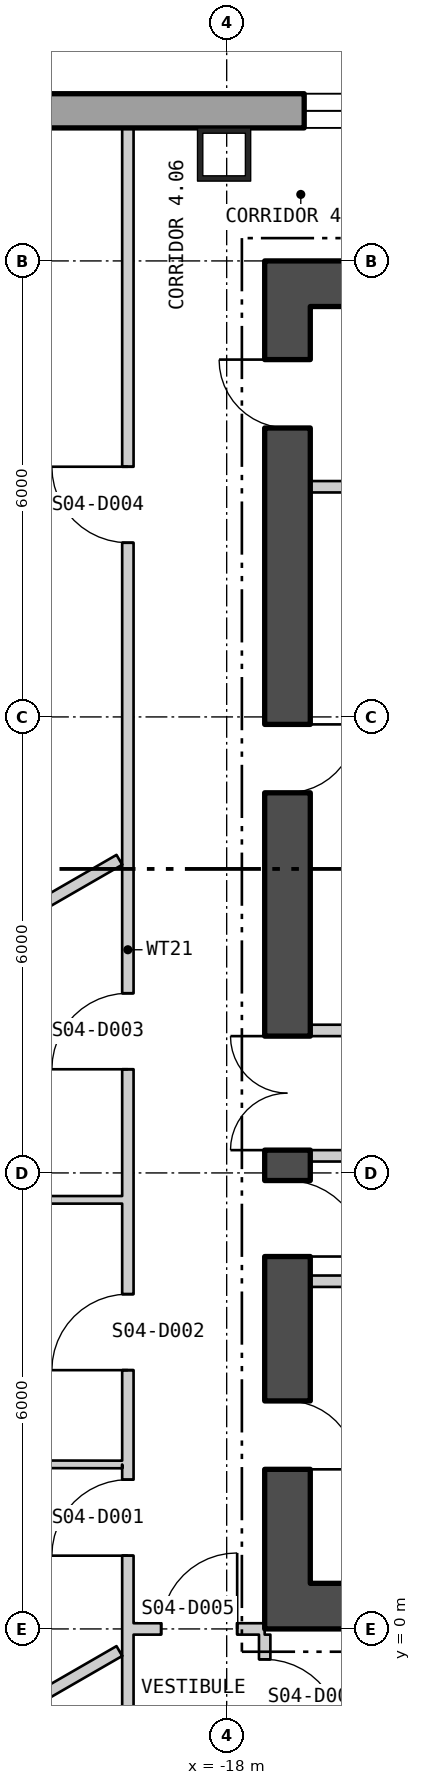
"""IFC4 building model, lengths in metres.
Left out: names, types, materials, properties, quantities, classifications, styles, units other than length and angle.
Written with IfcOpenShell. Run it as: python <this file> out.ifc"""

import sys

from ifc_helpers import new_model, si_unit, direction, frame, frame_2d, origin, origin_2d, place, context, subcontext, project, spatial, polyline, rectangle, hollow_rectangle, outline, extrude, element, fill, save


model = new_model("IFC4")
c1 = context("Model", 3, precision=1e-05, world=origin(), true_north=direction((0.0, 1.0)))
c2 = subcontext(c1, "Body", "Model", "MODEL_VIEW")
j1 = project(units=[si_unit("LENGTHUNIT", "METRE"), si_unit("PLANEANGLEUNIT", "RADIAN")], contexts=[c1])
p1 = place(None, origin())
s1 = spatial("IfcSite", under=j1, at=p1, CompositionType="ELEMENT")
p2 = place(p1, origin())
s2 = spatial("IfcBuilding", under=s1, at=p2, CompositionType="ELEMENT")
p3 = place(p2, frame((0.0, 0.0, 60.3)))
s3 = spatial("IfcBuildingStorey", under=s2, at=p3, CompositionType="ELEMENT", Elevation=60.3)
p4 = place(p3, frame((-18.034, 19.4, 0.0), z_axis=(0.0, 0.0, 1.0), x_axis=(-1.0, 0.0, 0.0)))
e1 = element("IfcColumn", 1, at=p4, inside=s3, PredefinedType="COLUMN", context=c2, shape_type="SweptSolid", body=[
    extrude(hollow_rectangle(XDim=0.7, YDim=0.7, WallThickness=0.07, at=origin_2d()), origin(), (0.0, 0.0, 1.0), 4.5),
])
p5 = place(p3, frame((22.875, 19.975, -0.4), z_axis=(0.0, 0.0, 1.0), x_axis=(-1.0, 0.0, 0.0)))
e2 = element("IfcWall", 2, at=p5, inside=s3, PredefinedType="SOLIDWALL", context=c2, shape_type="SweptSolid", body=[
    extrude(outline(polyline([(-0.13, -0.225), (45.88, -0.225), (45.62, 0.225), (0.13, 0.225), (-0.13, -0.225)])), origin(), (0.0, 0.0, 1.0), 4.5),
])
p6 = place(p5, frame((5.895, 0.0, 1.3)))
e3 = element("IfcOpeningElement", 3, at=p6, cuts=e2, PredefinedType="OPENING", context=c2, shape_type="SweptSolid", body=[
    extrude(rectangle(XDim=2.4, YDim=2.6, at=frame_2d((1.2, 1.3))), frame((0.0, 0.235, 0.0), z_axis=(0.0, -1.0, 0.0), x_axis=(1.0, 0.0, 0.0)), (0.0, 0.0, 1.0), 0.47),
])
p7 = place(p5, frame((10.403, 0.0, 1.3)))
e4 = element("IfcOpeningElement", 4, at=p7, cuts=e2, PredefinedType="OPENING", context=c2, shape_type="SweptSolid", body=[
    extrude(rectangle(XDim=2.4, YDim=2.6, at=frame_2d((1.2, 1.3))), frame((0.0, 0.235, 0.0), z_axis=(0.0, -1.0, 0.0), x_axis=(1.0, 0.0, 0.0)), (0.0, 0.0, 1.0), 0.47),
])
p8 = place(p5, frame((14.912, 0.0, 1.3)))
e5 = element("IfcOpeningElement", 5, at=p8, cuts=e2, PredefinedType="OPENING", context=c2, shape_type="SweptSolid", body=[
    extrude(rectangle(XDim=2.4, YDim=2.6, at=frame_2d((1.2, 1.3))), frame((0.0, 0.235, 0.0), z_axis=(0.0, -1.0, 0.0), x_axis=(1.0, 0.0, 0.0)), (0.0, 0.0, 1.0), 0.47),
])
p9 = place(p5, frame((19.421, 0.0, 1.3)))
e6 = element("IfcOpeningElement", 6, at=p9, cuts=e2, PredefinedType="OPENING", context=c2, shape_type="SweptSolid", body=[
    extrude(rectangle(XDim=2.4, YDim=2.6, at=frame_2d((1.2, 1.3))), frame((0.0, 0.235, 0.0), z_axis=(0.0, -1.0, 0.0), x_axis=(1.0, 0.0, 0.0)), (0.0, 0.0, 1.0), 0.47),
])
p10 = place(p5, frame((23.929, 0.0, 1.3)))
e7 = element("IfcOpeningElement", 7, at=p10, cuts=e2, PredefinedType="OPENING", context=c2, shape_type="SweptSolid", body=[
    extrude(rectangle(XDim=2.4, YDim=2.6, at=frame_2d((1.2, 1.3))), frame((0.0, 0.235, 0.0), z_axis=(0.0, -1.0, 0.0), x_axis=(1.0, 0.0, 0.0)), (0.0, 0.0, 1.0), 0.47),
])
p11 = place(p5, frame((28.438, 0.0, 1.3)))
e8 = element("IfcOpeningElement", 8, at=p11, cuts=e2, PredefinedType="OPENING", context=c2, shape_type="SweptSolid", body=[
    extrude(rectangle(XDim=2.4, YDim=2.6, at=frame_2d((1.2, 1.3))), frame((0.0, 0.235, 0.0), z_axis=(0.0, -1.0, 0.0), x_axis=(1.0, 0.0, 0.0)), (0.0, 0.0, 1.0), 0.47),
])
p12 = place(p5, frame((32.947, 0.0, 1.3)))
e9 = element("IfcOpeningElement", 9, at=p12, cuts=e2, PredefinedType="OPENING", context=c2, shape_type="SweptSolid", body=[
    extrude(rectangle(XDim=2.4, YDim=2.6, at=frame_2d((1.2, 1.3))), frame((0.0, 0.235, 0.0), z_axis=(0.0, -1.0, 0.0), x_axis=(1.0, 0.0, 0.0)), (0.0, 0.0, 1.0), 0.47),
])
p13 = place(p5, frame((37.455, 0.0, 1.3)))
e10 = element("IfcOpeningElement", 10, at=p13, cuts=e2, PredefinedType="OPENING", context=c2, shape_type="SweptSolid", body=[
    extrude(rectangle(XDim=2.4, YDim=2.6, at=frame_2d((1.2, 1.3))), frame((0.0, 0.235, 0.0), z_axis=(0.0, -1.0, 0.0), x_axis=(1.0, 0.0, 0.0)), (0.0, 0.0, 1.0), 0.47),
])
p14 = place(p3, frame((-28.3, 10.579, -0.18), z_axis=(0.0, 0.0, 1.0), x_axis=(0.499999388847, -0.866025756634, 0.0)))
e11 = element("IfcWall", 11, at=p14, inside=s3, PredefinedType="SOLIDWALL", context=c2, shape_type="SweptSolid", body=[
    extrude(outline(polyline([(-0.13, -0.225), (45.88, -0.225), (45.62, 0.225), (0.13, 0.225), (-0.13, -0.225)])), origin(), (0.0, 0.0, 1.0), 4.28),
])
p15 = place(p14, frame((1.425, 0.0, 1.08)))
e12 = element("IfcOpeningElement", 12, at=p15, cuts=e11, PredefinedType="OPENING", context=c2, shape_type="SweptSolid", body=[
    extrude(rectangle(XDim=2.4, YDim=2.6, at=frame_2d((1.2, 1.3))), frame((0.0, 0.235, 0.0), z_axis=(0.0, -1.0, 0.0), x_axis=(1.0, 0.0, 0.0)), (0.0, 0.0, 1.0), 0.47),
])
p16 = place(p14, frame((5.895, 0.0, 1.08)))
e13 = element("IfcOpeningElement", 13, at=p16, cuts=e11, PredefinedType="OPENING", context=c2, shape_type="SweptSolid", body=[
    extrude(rectangle(XDim=2.4, YDim=2.6, at=frame_2d((1.2, 1.3))), frame((0.0, 0.235, 0.0), z_axis=(0.0, -1.0, 0.0), x_axis=(1.0, 0.0, 0.0)), (0.0, 0.0, 1.0), 0.47),
])
p17 = place(p14, frame((10.403, 0.0, 1.08)))
e14 = element("IfcOpeningElement", 14, at=p17, cuts=e11, PredefinedType="OPENING", context=c2, shape_type="SweptSolid", body=[
    extrude(rectangle(XDim=2.4, YDim=2.6, at=frame_2d((1.2, 1.3))), frame((0.0, 0.235, 0.0), z_axis=(0.0, -1.0, 0.0), x_axis=(1.0, 0.0, 0.0)), (0.0, 0.0, 1.0), 0.47),
])
p18 = place(p14, frame((14.912, 0.0, 1.08)))
e15 = element("IfcOpeningElement", 15, at=p18, cuts=e11, PredefinedType="OPENING", context=c2, shape_type="SweptSolid", body=[
    extrude(rectangle(XDim=2.4, YDim=2.6, at=frame_2d((1.2, 1.3))), frame((0.0, 0.235, 0.0), z_axis=(0.0, -1.0, 0.0), x_axis=(1.0, 0.0, 0.0)), (0.0, 0.0, 1.0), 0.47),
])
p19 = place(p14, frame((19.421, 0.0, 1.08)))
e16 = element("IfcOpeningElement", 16, at=p19, cuts=e11, PredefinedType="OPENING", context=c2, shape_type="SweptSolid", body=[
    extrude(rectangle(XDim=2.4, YDim=2.6, at=frame_2d((1.2, 1.3))), frame((0.0, 0.235, 0.0), z_axis=(0.0, -1.0, 0.0), x_axis=(1.0, 0.0, 0.0)), (0.0, 0.0, 1.0), 0.47),
])
p20 = place(p14, frame((23.929, 0.0, 1.08)))
e17 = element("IfcOpeningElement", 17, at=p20, cuts=e11, PredefinedType="OPENING", context=c2, shape_type="SweptSolid", body=[
    extrude(rectangle(XDim=2.4, YDim=2.6, at=frame_2d((1.2, 1.3))), frame((0.0, 0.235, 0.0), z_axis=(0.0, -1.0, 0.0), x_axis=(1.0, 0.0, 0.0)), (0.0, 0.0, 1.0), 0.47),
])
p21 = place(p14, frame((28.438, 0.0, 1.08)))
e18 = element("IfcOpeningElement", 18, at=p21, cuts=e11, PredefinedType="OPENING", context=c2, shape_type="SweptSolid", body=[
    extrude(rectangle(XDim=2.4, YDim=2.6, at=frame_2d((1.2, 1.3))), frame((0.0, 0.235, 0.0), z_axis=(0.0, -1.0, 0.0), x_axis=(1.0, 0.0, 0.0)), (0.0, 0.0, 1.0), 0.47),
])
p22 = place(p14, frame((32.947, 0.0, 1.08)))
e19 = element("IfcOpeningElement", 19, at=p22, cuts=e11, PredefinedType="OPENING", context=c2, shape_type="SweptSolid", body=[
    extrude(rectangle(XDim=2.4, YDim=2.6, at=frame_2d((1.2, 1.3))), frame((0.0, 0.235, 0.0), z_axis=(0.0, -1.0, 0.0), x_axis=(1.0, 0.0, 0.0)), (0.0, 0.0, 1.0), 0.47),
])
p23 = place(p14, frame((37.455, 0.0, 1.08)))
e20 = element("IfcOpeningElement", 20, at=p23, cuts=e11, PredefinedType="OPENING", context=c2, shape_type="SweptSolid", body=[
    extrude(rectangle(XDim=2.4, YDim=2.6, at=frame_2d((1.2, 1.3))), frame((0.0, 0.235, 0.0), z_axis=(0.0, -1.0, 0.0), x_axis=(1.0, 0.0, 0.0)), (0.0, 0.0, 1.0), 0.47),
])
p24 = place(p14, frame((41.925, 0.0, 1.08)))
e21 = element("IfcOpeningElement", 21, at=p24, cuts=e11, PredefinedType="OPENING", context=c2, shape_type="SweptSolid", body=[
    extrude(rectangle(XDim=2.4, YDim=2.6, at=frame_2d((1.2, 1.3))), frame((0.0, 0.235, 0.0), z_axis=(0.0, -1.0, 0.0), x_axis=(1.0, 0.0, 0.0)), (0.0, 0.0, 1.0), 0.47),
])
p25 = place(p3, frame((-17.5, 0.3, 0.0), z_axis=(0.0, 0.0, 1.0), x_axis=(1.0, 0.0, 0.0)))
e22 = element("IfcWall", 22, at=p25, inside=s3, PredefinedType="SHEAR", context=c2, shape_type="SweptSolid", body=[
    extrude(rectangle(XDim=35.0, YDim=0.6, at=frame_2d((17.5, 0.0))), origin(), (0.0, 0.0, 1.0), 4.3),
])
p26 = place(p25, frame((12.0, 0.0, 0.0)))
e23 = element("IfcOpeningElement", 23, at=p26, cuts=e22, PredefinedType="OPENING", context=c2, shape_type="SweptSolid", body=[
    extrude(rectangle(XDim=1.8, YDim=2.4, at=frame_2d((0.9, 1.2))), frame((0.0, 0.31, 0.0), z_axis=(0.0, -1.0, 0.0), x_axis=(1.0, 0.0, 0.0)), (0.0, 0.0, 1.0), 0.62),
])
p27 = place(p25, frame((22.0, 0.0, 0.0)))
e24 = element("IfcOpeningElement", 24, at=p27, cuts=e22, PredefinedType="OPENING", context=c2, shape_type="SweptSolid", body=[
    extrude(rectangle(XDim=1.8, YDim=2.4, at=frame_2d((0.9, 1.2))), frame((0.0, 0.31, 0.0), z_axis=(0.0, -1.0, 0.0), x_axis=(1.0, 0.0, 0.0)), (0.0, 0.0, 1.0), 0.62),
])
p28 = place(p3, frame((-17.5, 17.7, 0.0), z_axis=(0.0, 0.0, 1.0), x_axis=(1.0, 0.0, 0.0)))
e25 = element("IfcWall", 25, at=p28, inside=s3, PredefinedType="SHEAR", context=c2, shape_type="SweptSolid", body=[
    extrude(rectangle(XDim=35.0, YDim=0.6, at=frame_2d((17.5, 0.0))), origin(), (0.0, 0.0, 1.0), 4.3),
])
p29 = place(p3, frame((-17.2, 0.6, 0.0), z_axis=(0.0, 0.0, 1.0), x_axis=(0.0, 1.0, 0.0)))
e26 = element("IfcWall", 26, at=p29, inside=s3, PredefinedType="SHEAR", context=c2, shape_type="SweptSolid", body=[
    extrude(rectangle(XDim=16.8, YDim=0.6, at=frame_2d((8.4, 0.0))), origin(), (0.0, 0.0, 1.0), 4.3),
])
p30 = place(p29, frame((5.7, 0.0, 0.0)))
e27 = element("IfcOpeningElement", 27, at=p30, cuts=e26, PredefinedType="OPENING", context=c2, shape_type="SweptSolid", body=[
    extrude(rectangle(XDim=1.5, YDim=2.1, at=frame_2d((0.75, 1.05))), frame((0.0, 0.31, 0.0), z_axis=(0.0, -1.0, 0.0), x_axis=(1.0, 0.0, 0.0)), (0.0, 0.0, 1.0), 0.62),
])
p31 = place(p29, frame((1.5, 0.0, 0.0)))
e28 = element("IfcOpeningElement", 28, at=p31, cuts=e26, PredefinedType="OPENING", context=c2, shape_type="SweptSolid", body=[
    extrude(rectangle(XDim=0.9, YDim=2.1, at=frame_2d((0.45, 1.05))), frame((0.0, 0.31, 0.0), z_axis=(0.0, -1.0, 0.0), x_axis=(1.0, 0.0, 0.0)), (0.0, 0.0, 1.0), 0.62),
])
p32 = place(p29, frame((4.3, 0.0, 0.0)))
e29 = element("IfcOpeningElement", 29, at=p32, cuts=e26, PredefinedType="OPENING", context=c2, shape_type="SweptSolid", body=[
    extrude(rectangle(XDim=1.0, YDim=2.1, at=frame_2d((0.5, 1.05))), frame((0.0, 0.31, 0.0), z_axis=(0.0, -1.0, 0.0), x_axis=(1.0, 0.0, 0.0)), (0.0, 0.0, 1.0), 0.62),
])
p33 = place(p29, frame((10.402, 0.0, 0.0)))
e30 = element("IfcOpeningElement", 30, at=p33, cuts=e26, PredefinedType="OPENING", context=c2, shape_type="SweptSolid", body=[
    extrude(rectangle(XDim=0.9, YDim=2.1, at=frame_2d((0.45, 1.05))), frame((0.0, 0.31, 0.0), z_axis=(0.0, -1.0, 0.0), x_axis=(1.0, 0.0, 0.0)), (0.0, 0.0, 1.0), 0.62),
])
p34 = place(p29, frame((15.202, 0.0, 0.0)))
e31 = element("IfcOpeningElement", 31, at=p34, cuts=e26, PredefinedType="OPENING", context=c2, shape_type="SweptSolid", body=[
    extrude(rectangle(XDim=0.9, YDim=2.1, at=frame_2d((0.45, 1.05))), frame((0.0, 0.31, 0.0), z_axis=(0.0, -1.0, 0.0), x_axis=(1.0, 0.0, 0.0)), (0.0, 0.0, 1.0), 0.62),
])
for number, where, z_axis, x_axis in (
    (32, (-16.9, 6.225, 0.0), (0.0, 0.0, 1.0), (1.0, 0.0, 0.0)),
    (33, (-16.9, 7.875, 0.0), (0.0, 0.0, 1.0), (1.0, 0.0, 0.0)),
    (34, (-16.9, 4.575, 0.0), (0.0, 0.0, 1.0), (1.0, 0.0, 0.0)),
    (35, (-16.9, 15.028, 0.0), (0.0, 0.0, 1.0), (1.0, 0.0, 0.0)),
):
    element("IfcWall", number, at=place(p3, frame(where, z_axis=z_axis, x_axis=x_axis)), inside=s3, PredefinedType="PARTITIONING", context=c2, shape_type="SweptSolid", body=[
        extrude(rectangle(XDim=2.4, YDim=0.15, at=frame_2d((1.2, 0.0))), origin(), (0.0, 0.0, 1.0), 4.3),
    ])
p35 = place(p3, frame((-25.296, 6.725, 0.0), z_axis=(0.0, 0.0, 1.0), x_axis=(0.866161077876, 0.499764931915, 0.0)))
e36 = element("IfcWall", 36, at=p35, inside=s3, PredefinedType="PARTITIONING", context=c2, shape_type="SweptSolid", body=[
    extrude(rectangle(XDim=6.793, YDim=0.15, at=frame_2d((3.397, 0.0))), origin(), (0.0, 0.0, 1.0), 4.3),
])
p36 = place(p3, frame((-25.192, 5.646, 0.0), z_axis=(0.0, 0.0, 1.0), x_axis=(1.0, 0.0, 0.0)))
e37 = element("IfcWall", 37, at=p36, inside=s3, PredefinedType="PARTITIONING", context=c2, shape_type="SweptSolid", body=[
    extrude(rectangle(XDim=5.817, YDim=0.1, at=frame_2d((2.909, 0.0))), origin(), (0.0, 0.0, 1.0), 4.3),
])
p37 = place(p3, frame((-23.185, 2.171, 0.0), z_axis=(0.0, 0.0, 1.0), x_axis=(0.999998312223, -0.00183726724, 0.0)))
e38 = element("IfcWall", 38, at=p37, inside=s3, PredefinedType="PARTITIONING", context=c2, shape_type="SweptSolid", body=[
    extrude(rectangle(XDim=3.81, YDim=0.1, at=frame_2d((1.905, 0.0))), origin(), (0.0, 0.0, 1.0), 4.3),
])
p38 = place(p3, frame((-20.787, -1.084, 0.0), z_axis=(0.0, 0.0, 1.0), x_axis=(0.866258995887, 0.499595188173, 0.0)))
e39 = element("IfcWall", 39, at=p38, inside=s3, PredefinedType="PARTITIONING", context=c2, shape_type="SweptSolid", body=[
    extrude(rectangle(XDim=1.587, YDim=0.15, at=frame_2d((0.794, 0.0))), origin(), (0.0, 0.0, 1.0), 4.3),
])
p39 = place(p3, frame((-19.3, -1.875, 0.0), z_axis=(0.0, 0.0, 1.0), x_axis=(0.0, 1.0, 0.0)))
e40 = element("IfcWall", 40, at=p39, inside=s3, PredefinedType="PARTITIONING", context=c2, shape_type="SweptSolid", body=[
    extrude(rectangle(XDim=21.623, YDim=0.15, at=frame_2d((10.812, 0.0))), origin(), (0.0, 0.0, 1.0), 4.3),
])
p40 = place(p39, frame((2.839, 0.0, 0.0)))
e41 = element("IfcOpeningElement", 41, at=p40, cuts=e40, PredefinedType="OPENING", context=c2, shape_type="SweptSolid", body=[
    extrude(rectangle(XDim=1.0, YDim=2.1, at=frame_2d((0.5, 1.05))), frame((0.0, 0.085, 0.0), z_axis=(0.0, -1.0, 0.0), x_axis=(1.0, 0.0, 0.0)), (0.0, 0.0, 1.0), 0.17),
])
p41 = place(p39, frame((5.28, 0.0, 0.0)))
e42 = element("IfcOpeningElement", 42, at=p41, cuts=e40, PredefinedType="OPENING", context=c2, shape_type="SweptSolid", body=[
    extrude(rectangle(XDim=1.0, YDim=2.1, at=frame_2d((0.5, 1.05))), frame((0.0, 0.085, 0.0), z_axis=(0.0, -1.0, 0.0), x_axis=(1.0, 0.0, 0.0)), (0.0, 0.0, 1.0), 0.17),
])
p42 = place(p39, frame((9.239, 0.0, 0.0)))
e43 = element("IfcOpeningElement", 43, at=p42, cuts=e40, PredefinedType="OPENING", context=c2, shape_type="SweptSolid", body=[
    extrude(rectangle(XDim=1.0, YDim=2.1, at=frame_2d((0.5, 1.05))), frame((0.0, 0.085, 0.0), z_axis=(0.0, -1.0, 0.0), x_axis=(1.0, 0.0, 0.0)), (0.0, 0.0, 1.0), 0.17),
])
p43 = place(p39, frame((16.167, 0.0, 0.0)))
e44 = element("IfcOpeningElement", 44, at=p43, cuts=e40, PredefinedType="OPENING", context=c2, shape_type="SweptSolid", body=[
    extrude(rectangle(XDim=1.0, YDim=2.1, at=frame_2d((0.5, 1.05))), frame((0.0, 0.085, 0.0), z_axis=(0.0, -1.0, 0.0), x_axis=(1.0, 0.0, 0.0)), (0.0, 0.0, 1.0), 0.17),
])
p44 = place(p3, frame((-19.225, 0.0, 0.0), z_axis=(0.0, 0.0, 1.0), x_axis=(1.0, 0.0, 0.0)))
e45 = element("IfcWall", 45, at=p44, inside=s3, PredefinedType="PARTITIONING", context=c2, shape_type="SweptSolid", body=[
    extrude(rectangle(XDim=1.725, YDim=0.15, at=frame_2d((0.863, 0.0))), origin(), (0.0, 0.0, 1.0), 3.61),
])
p45 = place(p44, frame((0.363, 0.0, 0.0)))
e46 = element("IfcOpeningElement", 46, at=p45, cuts=e45, PredefinedType="OPENING", context=c2, shape_type="SweptSolid", body=[
    extrude(rectangle(XDim=1.0, YDim=2.1, at=frame_2d((0.5, 1.05))), frame((0.0, 0.085, 0.0), z_axis=(0.0, -1.0, 0.0), x_axis=(1.0, 0.0, 0.0)), (0.0, 0.0, 1.0), 0.17),
])
p46 = place(p3, frame((-17.5, -1.725, 0.0), z_axis=(0.0, 0.0, 1.0), x_axis=(0.0, 1.0, 0.0)))
e47 = element("IfcWall", 47, at=p46, inside=s3, PredefinedType="PARTITIONING", context=c2, shape_type="SweptSolid", body=[
    extrude(rectangle(XDim=1.65, YDim=0.15, at=frame_2d((0.825, 0.0))), origin(), (0.0, 0.0, 1.0), 4.3),
])
p47 = place(p46, frame((0.325, 0.0, 0.0)))
e48 = element("IfcOpeningElement", 48, at=p47, cuts=e47, PredefinedType="OPENING", context=c2, shape_type="SweptSolid", body=[
    extrude(rectangle(XDim=1.0, YDim=2.1, at=frame_2d((0.5, 1.05))), frame((0.0, 0.085, 0.0), z_axis=(0.0, -1.0, 0.0), x_axis=(1.0, 0.0, 0.0)), (0.0, 0.0, 1.0), 0.17),
])
p48 = place(p13, origin())
e49 = element("IfcWindow", 49, at=p48, inside=s3, PartitioningType="SINGLE_PANEL", PredefinedType="WINDOW", context=c2, shape_type="SweptSolid", body=[
    extrude(rectangle(XDim=2.4, YDim=2.6, at=frame_2d((1.2, 1.3))), frame((0.0, 0.105, 0.0), z_axis=(0.0, -1.0, 0.0), x_axis=(1.0, 0.0, 0.0)), (0.0, 0.0, 1.0), 0.06),
])
fill(e10, e49)
p49 = place(p30, origin())
e50 = element("IfcDoor", 50, at=p49, inside=s3, OperationType="DOUBLE_DOOR_SINGLE_SWING", PredefinedType="DOOR", context=c2, shape_type="SweptSolid", body=[
    extrude(rectangle(XDim=1.5, YDim=2.1, at=frame_2d((0.75, 1.05))), frame((0.0, 0.025, 0.0), z_axis=(0.0, -1.0, 0.0), x_axis=(1.0, 0.0, 0.0)), (0.0, 0.0, 1.0), 0.05),
])
fill(e27, e50)
p50 = place(p31, origin())
e51 = element("IfcDoor", 51, at=p50, inside=s3, OperationType="SINGLE_SWING_LEFT", PredefinedType="DOOR", context=c2, shape_type="SweptSolid", body=[
    extrude(rectangle(XDim=0.9, YDim=2.1, at=frame_2d((0.45, 1.05))), frame((0.0, 0.025, 0.0), z_axis=(0.0, -1.0, 0.0), x_axis=(1.0, 0.0, 0.0)), (0.0, 0.0, 1.0), 0.05),
])
fill(e28, e51)
p51 = place(p32, origin())
e52 = element("IfcDoor", 52, at=p51, inside=s3, OperationType="SINGLE_SWING_LEFT", PredefinedType="DOOR", context=c2, shape_type="SweptSolid", body=[
    extrude(rectangle(XDim=1.0, YDim=2.1, at=frame_2d((0.5, 1.05))), frame((0.0, 0.025, 0.0), z_axis=(0.0, -1.0, 0.0), x_axis=(1.0, 0.0, 0.0)), (0.0, 0.0, 1.0), 0.05),
])
fill(e29, e52)
p52 = place(p33, origin())
e53 = element("IfcDoor", 53, at=p52, inside=s3, OperationType="SINGLE_SWING_RIGHT", PredefinedType="DOOR", context=c2, shape_type="SweptSolid", body=[
    extrude(rectangle(XDim=0.9, YDim=2.1, at=frame_2d((0.45, 1.05))), frame((0.0, 0.025, 0.0), z_axis=(0.0, -1.0, 0.0), x_axis=(1.0, 0.0, 0.0)), (0.0, 0.0, 1.0), 0.05),
])
fill(e30, e53)
p53 = place(p34, origin())
e54 = element("IfcDoor", 54, at=p53, inside=s3, OperationType="SINGLE_SWING_LEFT", PredefinedType="DOOR", context=c2, shape_type="SweptSolid", body=[
    extrude(rectangle(XDim=0.9, YDim=2.1, at=frame_2d((0.45, 1.05))), frame((0.0, 0.025, 0.0), z_axis=(0.0, -1.0, 0.0), x_axis=(1.0, 0.0, 0.0)), (0.0, 0.0, 1.0), 0.05),
])
fill(e31, e54)
p54 = place(p40, origin())
e55 = element("IfcDoor", 55, at=p54, inside=s3, OperationType="SINGLE_SWING_RIGHT", PredefinedType="DOOR", context=c2, shape_type="SweptSolid", body=[
    extrude(rectangle(XDim=1.0, YDim=2.1, at=frame_2d((0.5, 1.05))), frame((0.0, 0.025, 0.0), z_axis=(0.0, -1.0, 0.0), x_axis=(1.0, 0.0, 0.0)), (0.0, 0.0, 1.0), 0.05),
])
fill(e41, e55)
p55 = place(p41, origin())
e56 = element("IfcDoor", 56, at=p55, inside=s3, OperationType="SINGLE_SWING_RIGHT", PredefinedType="DOOR", context=c2, shape_type="SweptSolid", body=[
    extrude(rectangle(XDim=1.0, YDim=2.1, at=frame_2d((0.5, 1.05))), frame((0.0, 0.025, 0.0), z_axis=(0.0, -1.0, 0.0), x_axis=(1.0, 0.0, 0.0)), (0.0, 0.0, 1.0), 0.05),
])
fill(e42, e56)
p56 = place(p42, origin())
e57 = element("IfcDoor", 57, at=p56, inside=s3, OperationType="SINGLE_SWING_RIGHT", PredefinedType="DOOR", context=c2, shape_type="SweptSolid", body=[
    extrude(rectangle(XDim=1.0, YDim=2.1, at=frame_2d((0.5, 1.05))), frame((0.0, 0.025, 0.0), z_axis=(0.0, -1.0, 0.0), x_axis=(1.0, 0.0, 0.0)), (0.0, 0.0, 1.0), 0.05),
])
fill(e43, e57)
p57 = place(p43, origin())
e58 = element("IfcDoor", 58, at=p57, inside=s3, OperationType="SINGLE_SWING_LEFT", PredefinedType="DOOR", context=c2, shape_type="SweptSolid", body=[
    extrude(rectangle(XDim=1.0, YDim=2.1, at=frame_2d((0.5, 1.05))), frame((0.0, 0.025, 0.0), z_axis=(0.0, -1.0, 0.0), x_axis=(1.0, 0.0, 0.0)), (0.0, 0.0, 1.0), 0.05),
])
fill(e44, e58)
p58 = place(p45, origin())
e59 = element("IfcDoor", 59, at=p58, inside=s3, OperationType="SINGLE_SWING_LEFT", PredefinedType="DOOR", context=c2, shape_type="SweptSolid", body=[
    extrude(rectangle(XDim=1.0, YDim=2.1, at=frame_2d((0.5, 1.05))), frame((0.0, 0.025, 0.0), z_axis=(0.0, -1.0, 0.0), x_axis=(1.0, 0.0, 0.0)), (0.0, 0.0, 1.0), 0.05),
])
fill(e46, e59)
p59 = place(p47, origin())
e60 = element("IfcDoor", 60, at=p59, inside=s3, OperationType="SINGLE_SWING_LEFT", PredefinedType="DOOR", context=c2, shape_type="SweptSolid", body=[
    extrude(rectangle(XDim=1.0, YDim=2.1, at=frame_2d((0.5, 1.05))), frame((0.0, 0.025, 0.0), z_axis=(0.0, -1.0, 0.0), x_axis=(1.0, 0.0, 0.0)), (0.0, 0.0, 1.0), 0.05),
])
fill(e48, e60)
save(model, sys.argv[1])
